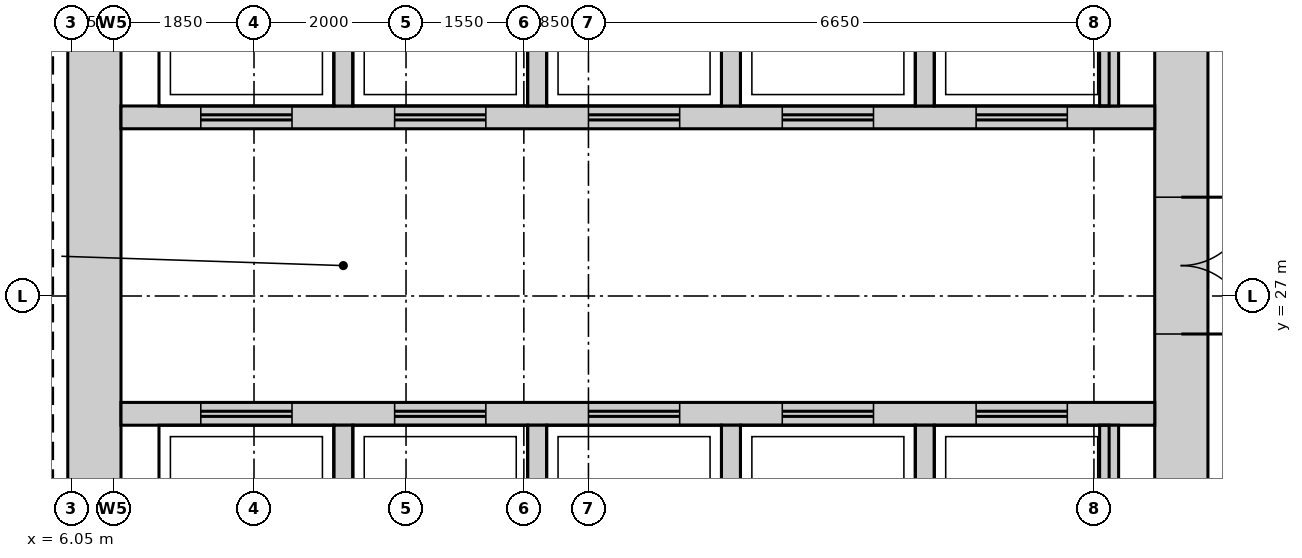
"""IFC4 building model, lengths in metres.
Left out: names, types, materials, properties, quantities, classifications, styles, units other than length and angle.
Written with IfcOpenShell. Run it as: python <this file> out.ifc"""

import sys

from ifc_helpers import new_model, si_unit, direction, frame, frame_2d, origin, place, context, subcontext, project, spatial, rectangle, extrude, source, transform, mapped, element, fill, save


model = new_model("IFC4")
c1 = context("Model", 3, precision=1e-05, world=origin(), true_north=direction((0.0, 1.0)))
c2 = subcontext(c1, "Body", "Model", "MODEL_VIEW")
j1 = project(units=[si_unit("LENGTHUNIT", "METRE"), si_unit("PLANEANGLEUNIT", "RADIAN")], contexts=[c1])
p1 = place(None, origin())
s1 = spatial("IfcSite", under=j1, at=p1, CompositionType="ELEMENT")
p2 = place(p1, origin())
s2 = spatial("IfcBuilding", under=s1, at=p2, CompositionType="ELEMENT")
p3 = place(p2, frame((0.0, 0.0, 246.2)))
s3 = spatial("IfcBuildingStorey", under=s2, at=p3, CompositionType="ELEMENT", Elevation=246.2)
m1 = source(origin(), c2, "Body", "SweptSolid", [
    extrude(rectangle(XDim=22.6, YDim=0.7, at=frame_2d((11.3, 0.0))), origin(), (0.0, 0.0, 1.0), 3.75),
])
p4 = place(p3, frame((20.65, 15.7, 0.0), z_axis=(0.0, 0.0, 1.0), x_axis=(0.0, 1.0, 0.0)))
e1 = element("IfcWall", 1, at=p4, inside=s3, PredefinedType="SHEAR", context=c2, shape_type="MappedRepresentation", body=[
    mapped(m1, transform((0.0, 0.0, 0.0))),
])
m2 = source(origin(), c2, "Body", "SweptSolid", [
    extrude(rectangle(XDim=1.8, YDim=2.1, at=frame_2d((0.9, 1.05))), frame((0.0, 0.36, 0.0), z_axis=(0.0, -1.0, 0.0), x_axis=(1.0, 0.0, 0.0)), (0.0, 0.0, 1.0), 0.72),
])
p5 = place(p4, frame((10.8, 0.0, 0.0)))
e2 = element("IfcOpeningElement", 2, at=p5, cuts=e1, PredefinedType="OPENING", context=c2, shape_type="MappedRepresentation", body=[
    mapped(m2, transform((0.0, 0.0, 0.0))),
])
m3 = source(origin(), c2, "Body", "SweptSolid", [
    extrude(rectangle(XDim=0.9, YDim=2.1, at=frame_2d((0.45, 1.05))), frame((0.0, 0.36, 0.0), z_axis=(0.0, -1.0, 0.0), x_axis=(1.0, 0.0, 0.0)), (0.0, 0.0, 1.0), 0.72),
])
p6 = place(p4, frame((0.45, 0.0, 0.0)))
e3 = element("IfcOpeningElement", 3, at=p6, cuts=e1, PredefinedType="OPENING", context=c2, shape_type="MappedRepresentation", body=[
    mapped(m3, transform((0.0, 0.0, 0.0))),
])
p7 = place(p4, frame((2.9, 0.0, 0.0)))
e4 = element("IfcOpeningElement", 4, at=p7, cuts=e1, PredefinedType="OPENING", context=c2, shape_type="MappedRepresentation", body=[
    mapped(m3, transform((0.0, 0.0, 0.0))),
])
p8 = place(p4, frame((5.65, 0.0, 0.0)))
e5 = element("IfcOpeningElement", 5, at=p8, cuts=e1, PredefinedType="OPENING", context=c2, shape_type="MappedRepresentation", body=[
    mapped(m3, transform((0.0, 0.0, 0.0))),
])
p9 = place(p3, frame((6.35, 15.7, 0.0), z_axis=(0.0, 0.0, 1.0), x_axis=(0.0, 1.0, 0.0)))
e6 = element("IfcWall", 6, at=p9, inside=s3, PredefinedType="SHEAR", context=c2, shape_type="MappedRepresentation", body=[
    mapped(m1, transform((0.0, 0.0, 0.0))),
])
m4 = source(origin(), c2, "Body", "SweptSolid", [
    extrude(rectangle(XDim=13.6, YDim=0.3, at=frame_2d((6.8, 0.0))), origin(), (0.0, 0.0, 1.0), 3.75),
])
p10 = place(p3, frame((6.7, 29.35, 0.0), z_axis=(0.0, 0.0, 1.0), x_axis=(1.0, 0.0, 0.0)))
e7 = element("IfcWall", 7, at=p10, inside=s3, PredefinedType="STANDARD", context=c2, shape_type="MappedRepresentation", body=[
    mapped(m4, transform((0.0, 0.0, 0.0))),
])
m5 = source(origin(), c2, "Body", "SweptSolid", [
    extrude(rectangle(XDim=1.2, YDim=2.1, at=frame_2d((0.6, 1.05))), frame((0.0, 0.16, 0.0), z_axis=(0.0, -1.0, 0.0), x_axis=(1.0, 0.0, 0.0)), (0.0, 0.0, 1.0), 0.32),
])
p11 = place(p10, frame((1.05, 0.0, 0.0)))
e8 = element("IfcOpeningElement", 8, at=p11, cuts=e7, PredefinedType="OPENING", context=c2, shape_type="MappedRepresentation", body=[
    mapped(m5, transform((0.0, 0.0, 0.0))),
])
p12 = place(p10, frame((3.6, 0.0, 0.0)))
e9 = element("IfcOpeningElement", 9, at=p12, cuts=e7, PredefinedType="OPENING", context=c2, shape_type="MappedRepresentation", body=[
    mapped(m5, transform((0.0, 0.0, 0.0))),
])
p13 = place(p10, frame((6.15, 0.0, 0.0)))
e10 = element("IfcOpeningElement", 10, at=p13, cuts=e7, PredefinedType="OPENING", context=c2, shape_type="MappedRepresentation", body=[
    mapped(m5, transform((0.0, 0.0, 0.0))),
])
p14 = place(p10, frame((8.7, 0.0, 0.0)))
e11 = element("IfcOpeningElement", 11, at=p14, cuts=e7, PredefinedType="OPENING", context=c2, shape_type="MappedRepresentation", body=[
    mapped(m5, transform((0.0, 0.0, 0.0))),
])
p15 = place(p10, frame((11.25, 0.0, 0.0)))
e12 = element("IfcOpeningElement", 12, at=p15, cuts=e7, PredefinedType="OPENING", context=c2, shape_type="MappedRepresentation", body=[
    mapped(m5, transform((0.0, 0.0, 0.0))),
])
p16 = place(p3, frame((6.7, 25.45, 0.0), z_axis=(0.0, 0.0, 1.0), x_axis=(1.0, 0.0, 0.0)))
e13 = element("IfcWall", 13, at=p16, inside=s3, PredefinedType="STANDARD", context=c2, shape_type="MappedRepresentation", body=[
    mapped(m4, transform((0.0, 0.0, 0.0))),
])
p17 = place(p16, frame((1.05, 0.0, 0.0)))
e14 = element("IfcOpeningElement", 14, at=p17, cuts=e13, PredefinedType="OPENING", context=c2, shape_type="MappedRepresentation", body=[
    mapped(m5, transform((0.0, 0.0, 0.0))),
])
p18 = place(p16, frame((3.6, 0.0, 0.0)))
e15 = element("IfcOpeningElement", 15, at=p18, cuts=e13, PredefinedType="OPENING", context=c2, shape_type="MappedRepresentation", body=[
    mapped(m5, transform((0.0, 0.0, 0.0))),
])
p19 = place(p16, frame((6.15, 0.0, 0.0)))
e16 = element("IfcOpeningElement", 16, at=p19, cuts=e13, PredefinedType="OPENING", context=c2, shape_type="MappedRepresentation", body=[
    mapped(m5, transform((0.0, 0.0, 0.0))),
])
p20 = place(p16, frame((8.7, 0.0, 0.0)))
e17 = element("IfcOpeningElement", 17, at=p20, cuts=e13, PredefinedType="OPENING", context=c2, shape_type="MappedRepresentation", body=[
    mapped(m5, transform((0.0, 0.0, 0.0))),
])
p21 = place(p16, frame((11.25, 0.0, 0.0)))
e18 = element("IfcOpeningElement", 18, at=p21, cuts=e13, PredefinedType="OPENING", context=c2, shape_type="MappedRepresentation", body=[
    mapped(m5, transform((0.0, 0.0, 0.0))),
])
m6 = source(origin(), c2, "Body", "SweptSolid", [
    extrude(rectangle(XDim=2.4, YDim=0.25, at=frame_2d((1.2, 0.0))), origin(), (0.0, 0.0, 1.0), 3.75),
])
for number, where, z_axis, x_axis in (
    (19, (17.275, 29.5, 0.0), (0.0, 0.0, 1.0), (0.0, 1.0, 0.0)),
    (20, (19.7, 29.5, 0.0), (0.0, 0.0, 1.0), (0.0, 1.0, 0.0)),
    (21, (9.625, 29.5, 0.0), (0.0, 0.0, 1.0), (0.0, 1.0, 0.0)),
    (22, (12.175, 29.5, 0.0), (0.0, 0.0, 1.0), (0.0, 1.0, 0.0)),
    (23, (14.725, 29.5, 0.0), (0.0, 0.0, 1.0), (0.0, 1.0, 0.0)),
):
    element("IfcWall", number, at=place(p3, frame(where, z_axis=z_axis, x_axis=x_axis)), inside=s3, PredefinedType="STANDARD", context=c2, shape_type="MappedRepresentation", body=[
        mapped(m6, transform((0.0, 0.0, 0.0))),
    ])
m7 = source(origin(), c2, "Body", "SweptSolid", [
    extrude(rectangle(XDim=2.4, YDim=0.25, at=frame_2d((1.2, 0.0))), origin(), (0.0, 0.0, 1.0), 3.75),
])
for number, where, z_axis, x_axis in (
    (24, (17.275, 22.9, 0.0), (0.0, 0.0, 1.0), (0.0, 1.0, 0.0)),
    (25, (19.7, 22.9, 0.0), (0.0, 0.0, 1.0), (0.0, 1.0, 0.0)),
    (26, (9.625, 22.9, 0.0), (0.0, 0.0, 1.0), (0.0, 1.0, 0.0)),
    (27, (12.175, 22.9, 0.0), (0.0, 0.0, 1.0), (0.0, 1.0, 0.0)),
    (28, (14.725, 22.9, 0.0), (0.0, 0.0, 1.0), (0.0, 1.0, 0.0)),
):
    element("IfcWall", number, at=place(p3, frame(where, z_axis=z_axis, x_axis=x_axis)), inside=s3, PredefinedType="STANDARD", context=c2, shape_type="MappedRepresentation", body=[
        mapped(m7, transform((0.0, 0.0, 0.0))),
    ])
m8 = source(origin(), c2, "Body", "SweptSolid", [
    extrude(rectangle(XDim=1.8, YDim=2.1, at=frame_2d((0.9, 1.05))), frame((0.0, 0.3, 0.0), z_axis=(0.0, -1.0, 0.0), x_axis=(1.0, 0.0, 0.0)), (0.0, 0.0, 1.0), 0.6),
])
p22 = place(p5, origin())
e29 = element("IfcDoor", 29, at=p22, inside=s3, OperationType="DOUBLE_DOOR_SINGLE_SWING", PredefinedType="DOOR", context=c2, shape_type="MappedRepresentation", body=[
    mapped(m8, transform((0.0, 0.0, 0.0))),
])
fill(e2, e29)
m9 = source(origin(), c2, "Body", "SweptSolid", [
    extrude(rectangle(XDim=1.2, YDim=2.1, at=frame_2d((0.6, 1.05))), frame((0.0, 0.025, 0.0), z_axis=(0.0, -1.0, 0.0), x_axis=(1.0, 0.0, 0.0)), (0.0, 0.0, 1.0), 0.05),
])
p23 = place(p17, origin())
e30 = element("IfcDoor", 30, at=p23, inside=s3, OperationType="DOUBLE_DOOR_SLIDING", PredefinedType="DOOR", context=c2, shape_type="MappedRepresentation", body=[
    mapped(m9, transform((0.0, 0.0, 0.0))),
])
fill(e14, e30)
p24 = place(p18, origin())
e31 = element("IfcDoor", 31, at=p24, inside=s3, OperationType="DOUBLE_DOOR_SLIDING", PredefinedType="DOOR", context=c2, shape_type="MappedRepresentation", body=[
    mapped(m9, transform((0.0, 0.0, 0.0))),
])
fill(e15, e31)
p25 = place(p19, origin())
e32 = element("IfcDoor", 32, at=p25, inside=s3, OperationType="DOUBLE_DOOR_SLIDING", PredefinedType="DOOR", context=c2, shape_type="MappedRepresentation", body=[
    mapped(m9, transform((0.0, 0.0, 0.0))),
])
fill(e16, e32)
p26 = place(p20, origin())
e33 = element("IfcDoor", 33, at=p26, inside=s3, OperationType="DOUBLE_DOOR_SLIDING", PredefinedType="DOOR", context=c2, shape_type="MappedRepresentation", body=[
    mapped(m9, transform((0.0, 0.0, 0.0))),
])
fill(e17, e33)
p27 = place(p21, origin())
e34 = element("IfcDoor", 34, at=p27, inside=s3, OperationType="DOUBLE_DOOR_SLIDING", PredefinedType="DOOR", context=c2, shape_type="MappedRepresentation", body=[
    mapped(m9, transform((0.0, 0.0, 0.0))),
])
fill(e18, e34)
p28 = place(p11, origin())
e35 = element("IfcDoor", 35, at=p28, inside=s3, OperationType="DOUBLE_DOOR_SLIDING", PredefinedType="DOOR", context=c2, shape_type="MappedRepresentation", body=[
    mapped(m9, transform((0.0, 0.0, 0.0))),
])
fill(e8, e35)
p29 = place(p12, origin())
e36 = element("IfcDoor", 36, at=p29, inside=s3, OperationType="DOUBLE_DOOR_SLIDING", PredefinedType="DOOR", context=c2, shape_type="MappedRepresentation", body=[
    mapped(m9, transform((0.0, 0.0, 0.0))),
])
fill(e9, e36)
p30 = place(p13, origin())
e37 = element("IfcDoor", 37, at=p30, inside=s3, OperationType="DOUBLE_DOOR_SLIDING", PredefinedType="DOOR", context=c2, shape_type="MappedRepresentation", body=[
    mapped(m9, transform((0.0, 0.0, 0.0))),
])
fill(e10, e37)
p31 = place(p14, origin())
e38 = element("IfcDoor", 38, at=p31, inside=s3, OperationType="DOUBLE_DOOR_SLIDING", PredefinedType="DOOR", context=c2, shape_type="MappedRepresentation", body=[
    mapped(m9, transform((0.0, 0.0, 0.0))),
])
fill(e11, e38)
p32 = place(p15, origin())
e39 = element("IfcDoor", 39, at=p32, inside=s3, OperationType="DOUBLE_DOOR_SLIDING", PredefinedType="DOOR", context=c2, shape_type="MappedRepresentation", body=[
    mapped(m9, transform((0.0, 0.0, 0.0))),
])
fill(e12, e39)
save(model, sys.argv[1])
